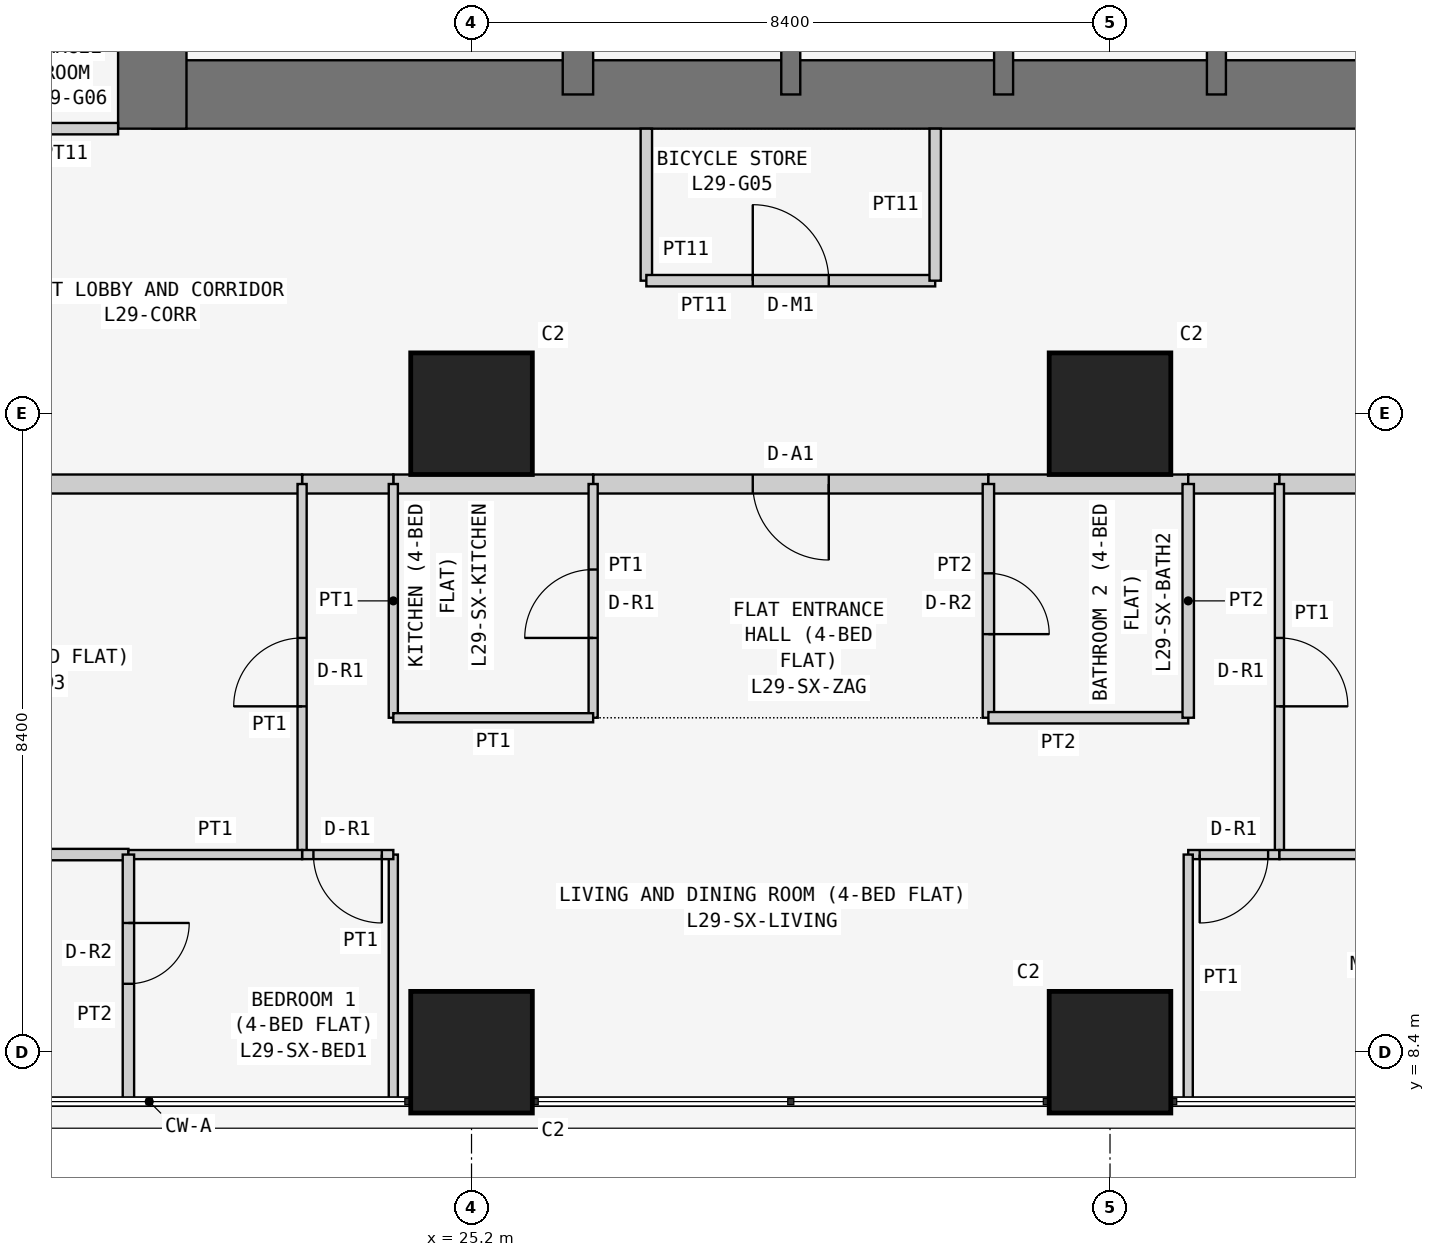
"""IFC4 building model, lengths in metres.
Left out: names, types, materials, properties, quantities, classifications, styles, units other than length and angle.
Written with IfcOpenShell. Run it as: python <this file> out.ifc"""

import sys

from ifc_helpers import new_model, si_unit, direction, frame, frame_2d, origin, origin_2d, place, context, subcontext, project, spatial, rectangle, extrude, element, fill, save


model = new_model("IFC4")
c1 = context("Model", 3, precision=1e-05, world=origin(), true_north=direction((0.0, 1.0)))
c2 = subcontext(c1, "Body", "Model", "MODEL_VIEW")
j1 = project(units=[si_unit("LENGTHUNIT", "METRE"), si_unit("PLANEANGLEUNIT", "RADIAN")], contexts=[c1])
p1 = place(None, origin())
s1 = spatial("IfcSite", under=j1, at=p1, CompositionType="ELEMENT")
p2 = place(p1, origin())
s2 = spatial("IfcBuilding", under=s1, at=p2, CompositionType="ELEMENT")
p3 = place(p2, frame((0.0, 0.0, 116.1)))
s3 = spatial("IfcBuildingStorey", under=s2, at=p3, CompositionType="ELEMENT", Elevation=116.1)
for number, where, z_axis, x_axis in (
    (1, (25.2, 8.4, 0.0), (0.0, 0.0, 1.0), (1.0, 0.0, 0.0)),
    (2, (25.2, 16.8, 0.0), (0.0, 0.0, 1.0), (1.0, 0.0, 0.0)),
    (3, (33.6, 8.4, 0.0), (0.0, 0.0, 1.0), (1.0, 0.0, 0.0)),
    (4, (33.6, 16.8, 0.0), (0.0, 0.0, 1.0), (1.0, 0.0, 0.0)),
):
    element("IfcColumn", number, at=place(p3, frame(where, z_axis=z_axis, x_axis=x_axis)), inside=s3, PredefinedType="COLUMN", context=c2, shape_type="SweptSolid", body=[
        extrude(rectangle(XDim=1.6, YDim=1.6, at=origin_2d()), origin(), (0.0, 0.0, 1.0), 3.6),
    ])
p4 = place(p3, frame((21.0, 21.0, 0.0), z_axis=(0.0, 0.0, 1.0), x_axis=(1.0, 0.0, 0.0)))
e5 = element("IfcWall", 5, at=p4, inside=s3, PredefinedType="SHEAR", context=c2, shape_type="SweptSolid", body=[
    extrude(rectangle(XDim=17.25, YDim=0.9, at=frame_2d((8.625, 0.0))), origin(), (0.0, 0.0, 1.0), 3.6),
])
p5 = place(p3, frame((21.0, 37.8, 0.0), z_axis=(0.0, 0.0, 1.0), x_axis=(0.0, -1.0, 0.0)))
e6 = element("IfcWall", 6, at=p5, inside=s3, PredefinedType="SHEAR", context=c2, shape_type="SweptSolid", body=[
    extrude(rectangle(XDim=17.25, YDim=0.9, at=frame_2d((8.625, 0.0))), origin(), (0.0, 0.0, 1.0), 3.6),
])
p6 = place(p5, frame((5.4, 0.0, 0.0)))
e7 = element("IfcOpeningElement", 7, at=p6, cuts=e6, PredefinedType="OPENING", context=c2, shape_type="SweptSolid", body=[
    extrude(rectangle(XDim=1.2, YDim=2.1, at=frame_2d((0.6, 1.05))), frame((0.0, 0.46, 0.0), z_axis=(0.0, -1.0, 0.0), x_axis=(1.0, 0.0, 0.0)), (0.0, 0.0, 1.0), 0.92),
])
p7 = place(p3, frame((26.6, 21.0, 0.0), z_axis=(0.0, 0.0, 1.0), x_axis=(0.0, 1.0, 0.0)))
e8 = element("IfcWall", 8, at=p7, inside=s3, PredefinedType="SHEAR", context=c2, shape_type="SweptSolid", body=[
    extrude(rectangle(XDim=16.8, YDim=0.4, at=frame_2d((8.4, 0.0))), origin(), (0.0, 0.0, 1.0), 3.6),
])
p8 = place(p7, frame((10.4, 0.0, 0.0)))
e9 = element("IfcOpeningElement", 9, at=p8, cuts=e8, PredefinedType="OPENING", context=c2, shape_type="SweptSolid", body=[
    extrude(rectangle(XDim=1.2, YDim=2.1, at=frame_2d((0.6, 1.05))), frame((0.0, 0.21, 0.0), z_axis=(0.0, -1.0, 0.0), x_axis=(1.0, 0.0, 0.0)), (0.0, 0.0, 1.0), 0.42),
])
for number, where, z_axis, x_axis in (
    (10, (29.4, 21.0, 0.0), (0.0, 0.0, 1.0), (0.0, 1.0, 0.0)),
    (11, (32.2, 21.0, 0.0), (0.0, 0.0, 1.0), (0.0, 1.0, 0.0)),
    (12, (35.0, 21.0, 0.0), (0.0, 0.0, 1.0), (0.0, 1.0, 0.0)),
):
    element("IfcWall", number, at=place(p3, frame(where, z_axis=z_axis, x_axis=x_axis)), inside=s3, PredefinedType="SHEAR", context=c2, shape_type="SweptSolid", body=[
        extrude(rectangle(XDim=3.2, YDim=0.25, at=frame_2d((1.6, 0.0))), origin(), (0.0, 0.0, 1.0), 3.6),
    ])
p9 = place(p3, frame((27.5, 20.55, 0.0), z_axis=(0.0, 0.0, 1.0), x_axis=(0.0, -1.0, 0.0)))
e13 = element("IfcWall", 13, at=p9, inside=s3, PredefinedType="PARTITIONING", context=c2, shape_type="SweptSolid", body=[
    extrude(rectangle(XDim=2.0, YDim=0.15, at=frame_2d((1.0, 0.0))), origin(), (0.0, 0.0, 1.0), 3.45),
])
p10 = place(p3, frame((27.5, 18.55, 0.0), z_axis=(0.0, 0.0, 1.0), x_axis=(1.0, 0.0, 0.0)))
e14 = element("IfcWall", 14, at=p10, inside=s3, PredefinedType="PARTITIONING", context=c2, shape_type="SweptSolid", body=[
    extrude(rectangle(XDim=3.8, YDim=0.15, at=frame_2d((1.9, 0.0))), origin(), (0.0, 0.0, 1.0), 3.45),
])
p11 = place(p10, frame((1.4, 0.0, 0.0)))
e15 = element("IfcOpeningElement", 15, at=p11, cuts=e14, PredefinedType="OPENING", context=c2, shape_type="SweptSolid", body=[
    extrude(rectangle(XDim=1.0, YDim=2.1, at=frame_2d((0.5, 1.05))), frame((0.0, 0.085, 0.0), z_axis=(0.0, -1.0, 0.0), x_axis=(1.0, 0.0, 0.0)), (0.0, 0.0, 1.0), 0.17),
])
p12 = place(p3, frame((31.3, 18.55, 0.0), z_axis=(0.0, 0.0, 1.0), x_axis=(0.0, 1.0, 0.0)))
e16 = element("IfcWall", 16, at=p12, inside=s3, PredefinedType="PARTITIONING", context=c2, shape_type="SweptSolid", body=[
    extrude(rectangle(XDim=2.0, YDim=0.15, at=frame_2d((1.0, 0.0))), origin(), (0.0, 0.0, 1.0), 3.45),
])
p13 = place(p3, frame((19.15, 20.55, 0.0), z_axis=(0.0, 0.0, 1.0), x_axis=(1.0, 0.0, 0.0)))
e17 = element("IfcWall", 17, at=p13, inside=s3, PredefinedType="PARTITIONING", context=c2, shape_type="SweptSolid", body=[
    extrude(rectangle(XDim=1.4, YDim=0.15, at=frame_2d((0.7, 0.0))), origin(), (0.0, 0.0, 1.0), 3.45),
])
p14 = place(p3, frame((32.0, 15.875, 0.0), z_axis=(0.0, 0.0, 1.0), x_axis=(-1.0, 0.0, 0.0)))
e18 = element("IfcWall", 18, at=p14, inside=s3, PredefinedType="PARTITIONING", context=c2, shape_type="SweptSolid", body=[
    extrude(rectangle(XDim=5.2, YDim=0.25, at=frame_2d((2.6, 0.0))), origin(), (0.0, 0.0, 1.0), 3.45),
])
p15 = place(p14, frame((2.1, 0.0, 0.0)))
e19 = element("IfcOpeningElement", 19, at=p15, cuts=e18, PredefinedType="OPENING", context=c2, shape_type="SweptSolid", body=[
    extrude(rectangle(XDim=1.0, YDim=2.1, at=frame_2d((0.5, 1.05))), frame((0.0, 0.135, 0.0), z_axis=(0.0, -1.0, 0.0), x_axis=(1.0, 0.0, 0.0)), (0.0, 0.0, 1.0), 0.27),
])
p16 = place(p3, frame((34.629, 15.875, 0.0), z_axis=(0.0, 0.0, 1.0), x_axis=(-1.0, 0.0, 0.0)))
e20 = element("IfcWall", 20, at=p16, inside=s3, PredefinedType="PARTITIONING", context=c2, shape_type="SweptSolid", body=[
    extrude(rectangle(XDim=2.629, YDim=0.25, at=frame_2d((1.314, 0.0))), origin(), (0.0, 0.0, 1.0), 3.45),
])
p17 = place(p3, frame((26.8, 15.875, 0.0), z_axis=(0.0, 0.0, 1.0), x_axis=(-1.0, 0.0, 0.0)))
e21 = element("IfcWall", 21, at=p17, inside=s3, PredefinedType="PARTITIONING", context=c2, shape_type="SweptSolid", body=[
    extrude(rectangle(XDim=2.629, YDim=0.25, at=frame_2d((1.314, 0.0))), origin(), (0.0, 0.0, 1.0), 3.45),
])
p18 = place(p3, frame((24.171, 15.875, 0.0), z_axis=(0.0, 0.0, 1.0), x_axis=(-1.0, 0.0, 0.0)))
e22 = element("IfcWall", 22, at=p18, inside=s3, PredefinedType="PARTITIONING", context=c2, shape_type="SweptSolid", body=[
    extrude(rectangle(XDim=1.2, YDim=0.25, at=frame_2d((0.6, 0.0))), origin(), (0.0, 0.0, 1.0), 3.45),
])
p19 = place(p3, frame((35.829, 15.875, 0.0), z_axis=(0.0, 0.0, 1.0), x_axis=(-1.0, 0.0, 0.0)))
e23 = element("IfcWall", 23, at=p19, inside=s3, PredefinedType="PARTITIONING", context=c2, shape_type="SweptSolid", body=[
    extrude(rectangle(XDim=1.2, YDim=0.25, at=frame_2d((0.6, 0.0))), origin(), (0.0, 0.0, 1.0), 3.45),
])
for number, where, z_axis, x_axis in (
    (24, (42.7, 15.875, 0.0), (0.0, 0.0, 1.0), (-1.0, 0.0, 0.0)),
    (25, (22.971, 15.875, 0.0), (0.0, 0.0, 1.0), (-1.0, 0.0, 0.0)),
):
    element("IfcWall", number, at=place(p3, frame(where, z_axis=z_axis, x_axis=x_axis)), inside=s3, PredefinedType="PARTITIONING", context=c2, shape_type="SweptSolid", body=[
        extrude(rectangle(XDim=6.871, YDim=0.25, at=frame_2d((3.436, 0.0))), origin(), (0.0, 0.0, 1.0), 3.45),
    ])
p20 = place(p3, frame((32.0, 12.8, 0.0), z_axis=(0.0, 0.0, 1.0), x_axis=(0.0, 1.0, 0.0)))
e26 = element("IfcWall", 26, at=p20, inside=s3, PredefinedType="PARTITIONING", context=c2, shape_type="SweptSolid", body=[
    extrude(rectangle(XDim=3.075, YDim=0.15, at=frame_2d((1.538, 0.0))), origin(), (0.0, 0.0, 1.0), 3.45),
])
p21 = place(p20, frame((1.1, 0.0, 0.0)))
e27 = element("IfcOpeningElement", 27, at=p21, cuts=e26, PredefinedType="OPENING", context=c2, shape_type="SweptSolid", body=[
    extrude(rectangle(XDim=0.8, YDim=2.1, at=frame_2d((0.4, 1.05))), frame((0.0, 0.085, 0.0), z_axis=(0.0, -1.0, 0.0), x_axis=(1.0, 0.0, 0.0)), (0.0, 0.0, 1.0), 0.17),
])
p22 = place(p3, frame((26.8, 15.875, 0.0), z_axis=(0.0, 0.0, 1.0), x_axis=(0.0, -1.0, 0.0)))
e28 = element("IfcWall", 28, at=p22, inside=s3, PredefinedType="PARTITIONING", context=c2, shape_type="SweptSolid", body=[
    extrude(rectangle(XDim=3.075, YDim=0.12, at=frame_2d((1.538, 0.0))), origin(), (0.0, 0.0, 1.0), 3.45),
])
p23 = place(p22, frame((1.125, 0.0, 0.0)))
e29 = element("IfcOpeningElement", 29, at=p23, cuts=e28, PredefinedType="OPENING", context=c2, shape_type="SweptSolid", body=[
    extrude(rectangle(XDim=0.9, YDim=2.1, at=frame_2d((0.45, 1.05))), frame((0.0, 0.07, 0.0), z_axis=(0.0, -1.0, 0.0), x_axis=(1.0, 0.0, 0.0)), (0.0, 0.0, 1.0), 0.14),
])
p24 = place(p3, frame((32.0, 12.8, 0.0), z_axis=(0.0, 0.0, 1.0), x_axis=(1.0, 0.0, 0.0)))
e30 = element("IfcWall", 30, at=p24, inside=s3, PredefinedType="PARTITIONING", context=c2, shape_type="SweptSolid", body=[
    extrude(rectangle(XDim=2.629, YDim=0.15, at=frame_2d((1.314, 0.0))), origin(), (0.0, 0.0, 1.0), 3.45),
])
p25 = place(p3, frame((34.629, 12.8, 0.0), z_axis=(0.0, 0.0, 1.0), x_axis=(0.0, 1.0, 0.0)))
e31 = element("IfcWall", 31, at=p25, inside=s3, PredefinedType="PARTITIONING", context=c2, shape_type="SweptSolid", body=[
    extrude(rectangle(XDim=3.075, YDim=0.15, at=frame_2d((1.538, 0.0))), origin(), (0.0, 0.0, 1.0), 3.45),
])
p26 = place(p3, frame((24.171, 15.875, 0.0), z_axis=(0.0, 0.0, 1.0), x_axis=(0.0, -1.0, 0.0)))
e32 = element("IfcWall", 32, at=p26, inside=s3, PredefinedType="PARTITIONING", context=c2, shape_type="SweptSolid", body=[
    extrude(rectangle(XDim=3.075, YDim=0.12, at=frame_2d((1.538, 0.0))), origin(), (0.0, 0.0, 1.0), 3.45),
])
p27 = place(p3, frame((24.171, 12.8, 0.0), z_axis=(0.0, 0.0, 1.0), x_axis=(1.0, 0.0, 0.0)))
e33 = element("IfcWall", 33, at=p27, inside=s3, PredefinedType="PARTITIONING", context=c2, shape_type="SweptSolid", body=[
    extrude(rectangle(XDim=2.629, YDim=0.12, at=frame_2d((1.314, 0.0))), origin(), (0.0, 0.0, 1.0), 3.45),
])
p28 = place(p3, frame((35.829, 15.875, 0.0), z_axis=(0.0, 0.0, 1.0), x_axis=(0.0, -1.0, 0.0)))
e34 = element("IfcWall", 34, at=p28, inside=s3, PredefinedType="PARTITIONING", context=c2, shape_type="SweptSolid", body=[
    extrude(rectangle(XDim=4.875, YDim=0.12, at=frame_2d((2.438, 0.0))), origin(), (0.0, 0.0, 1.0), 3.45),
])
p29 = place(p28, frame((2.025, 0.0, 0.0)))
e35 = element("IfcOpeningElement", 35, at=p29, cuts=e34, PredefinedType="OPENING", context=c2, shape_type="SweptSolid", body=[
    extrude(rectangle(XDim=0.9, YDim=2.1, at=frame_2d((0.45, 1.05))), frame((0.0, 0.07, 0.0), z_axis=(0.0, -1.0, 0.0), x_axis=(1.0, 0.0, 0.0)), (0.0, 0.0, 1.0), 0.14),
])
p30 = place(p3, frame((35.829, 11.0, 0.0), z_axis=(0.0, 0.0, 1.0), x_axis=(-1.0, 0.0, 0.0)))
e36 = element("IfcWall", 36, at=p30, inside=s3, PredefinedType="PARTITIONING", context=c2, shape_type="SweptSolid", body=[
    extrude(rectangle(XDim=1.2, YDim=0.12, at=frame_2d((0.6, 0.0))), origin(), (0.0, 0.0, 1.0), 3.45),
])
p31 = place(p30, frame((0.149, 0.0, 0.0)))
e37 = element("IfcOpeningElement", 37, at=p31, cuts=e36, PredefinedType="OPENING", context=c2, shape_type="SweptSolid", body=[
    extrude(rectangle(XDim=0.9, YDim=2.1, at=frame_2d((0.45, 1.05))), frame((0.0, 0.07, 0.0), z_axis=(0.0, -1.0, 0.0), x_axis=(1.0, 0.0, 0.0)), (0.0, 0.0, 1.0), 0.14),
])
p32 = place(p3, frame((34.629, 11.0, 0.0), z_axis=(0.0, 0.0, 1.0), x_axis=(0.0, -1.0, 0.0)))
e38 = element("IfcWall", 38, at=p32, inside=s3, PredefinedType="PARTITIONING", context=c2, shape_type="SweptSolid", body=[
    extrude(rectangle(XDim=3.25, YDim=0.12, at=frame_2d((1.625, 0.0))), origin(), (0.0, 0.0, 1.0), 3.45),
])
p33 = place(p3, frame((22.971, 11.0, 0.0), z_axis=(0.0, 0.0, 1.0), x_axis=(0.0, 1.0, 0.0)))
e39 = element("IfcWall", 39, at=p33, inside=s3, PredefinedType="PARTITIONING", context=c2, shape_type="SweptSolid", body=[
    extrude(rectangle(XDim=4.875, YDim=0.12, at=frame_2d((2.438, 0.0))), origin(), (0.0, 0.0, 1.0), 3.45),
])
p34 = place(p33, frame((1.95, 0.0, 0.0)))
e40 = element("IfcOpeningElement", 40, at=p34, cuts=e39, PredefinedType="OPENING", context=c2, shape_type="SweptSolid", body=[
    extrude(rectangle(XDim=0.9, YDim=2.1, at=frame_2d((0.45, 1.05))), frame((0.0, 0.07, 0.0), z_axis=(0.0, -1.0, 0.0), x_axis=(1.0, 0.0, 0.0)), (0.0, 0.0, 1.0), 0.14),
])
p35 = place(p3, frame((24.171, 7.75, 0.0), z_axis=(0.0, 0.0, 1.0), x_axis=(0.0, 1.0, 0.0)))
e41 = element("IfcWall", 41, at=p35, inside=s3, PredefinedType="PARTITIONING", context=c2, shape_type="SweptSolid", body=[
    extrude(rectangle(XDim=3.25, YDim=0.12, at=frame_2d((1.625, 0.0))), origin(), (0.0, 0.0, 1.0), 3.45),
])
p36 = place(p3, frame((24.171, 11.0, 0.0), z_axis=(0.0, 0.0, 1.0), x_axis=(-1.0, 0.0, 0.0)))
e42 = element("IfcWall", 42, at=p36, inside=s3, PredefinedType="PARTITIONING", context=c2, shape_type="SweptSolid", body=[
    extrude(rectangle(XDim=1.2, YDim=0.12, at=frame_2d((0.6, 0.0))), origin(), (0.0, 0.0, 1.0), 3.45),
])
p37 = place(p36, frame((0.151, 0.0, 0.0)))
e43 = element("IfcOpeningElement", 43, at=p37, cuts=e42, PredefinedType="OPENING", context=c2, shape_type="SweptSolid", body=[
    extrude(rectangle(XDim=0.9, YDim=2.1, at=frame_2d((0.45, 1.05))), frame((0.0, 0.07, 0.0), z_axis=(0.0, -1.0, 0.0), x_axis=(1.0, 0.0, 0.0)), (0.0, 0.0, 1.0), 0.14),
])
p38 = place(p3, frame((35.829, 11.0, 0.0), z_axis=(0.0, 0.0, 1.0), x_axis=(1.0, 0.0, 0.0)))
e44 = element("IfcWall", 44, at=p38, inside=s3, PredefinedType="PARTITIONING", context=c2, shape_type="SweptSolid", body=[
    extrude(rectangle(XDim=6.871, YDim=0.12, at=frame_2d((3.436, 0.0))), origin(), (0.0, 0.0, 1.0), 3.45),
])
p39 = place(p3, frame((16.1, 11.0, 0.0), z_axis=(0.0, 0.0, 1.0), x_axis=(1.0, 0.0, 0.0)))
e45 = element("IfcWall", 45, at=p39, inside=s3, PredefinedType="PARTITIONING", context=c2, shape_type="SweptSolid", body=[
    extrude(rectangle(XDim=4.586, YDim=0.15, at=frame_2d((2.293, 0.0))), origin(), (0.0, 0.0, 1.0), 3.45),
])
p40 = place(p3, frame((20.686, 11.0, 0.0), z_axis=(0.0, 0.0, 1.0), x_axis=(1.0, 0.0, 0.0)))
e46 = element("IfcWall", 46, at=p40, inside=s3, PredefinedType="PARTITIONING", context=c2, shape_type="SweptSolid", body=[
    extrude(rectangle(XDim=2.285, YDim=0.12, at=frame_2d((1.143, 0.0))), origin(), (0.0, 0.0, 1.0), 3.45),
])
p41 = place(p3, frame((20.686, 7.75, 0.0), z_axis=(0.0, 0.0, 1.0), x_axis=(0.0, 1.0, 0.0)))
e47 = element("IfcWall", 47, at=p41, inside=s3, PredefinedType="PARTITIONING", context=c2, shape_type="SweptSolid", body=[
    extrude(rectangle(XDim=3.25, YDim=0.15, at=frame_2d((1.625, 0.0))), origin(), (0.0, 0.0, 1.0), 3.45),
])
p42 = place(p41, frame((1.55, 0.0, 0.0)))
e48 = element("IfcOpeningElement", 48, at=p42, cuts=e47, PredefinedType="OPENING", context=c2, shape_type="SweptSolid", body=[
    extrude(rectangle(XDim=0.8, YDim=2.1, at=frame_2d((0.4, 1.05))), frame((0.0, 0.085, 0.0), z_axis=(0.0, -1.0, 0.0), x_axis=(1.0, 0.0, 0.0)), (0.0, 0.0, 1.0), 0.17),
])
p43 = place(p11, origin())
e49 = element("IfcDoor", 49, at=p43, inside=s3, OperationType="SINGLE_SWING_LEFT", PredefinedType="DOOR", context=c2, shape_type="SweptSolid", body=[
    extrude(rectangle(XDim=1.0, YDim=2.1, at=frame_2d((0.5, 1.05))), frame((0.0, 0.025, 0.0), z_axis=(0.0, -1.0, 0.0), x_axis=(1.0, 0.0, 0.0)), (0.0, 0.0, 1.0), 0.05),
])
fill(e15, e49)
p44 = place(p15, origin())
e50 = element("IfcDoor", 50, at=p44, inside=s3, OperationType="SINGLE_SWING_LEFT", PredefinedType="DOOR", context=c2, shape_type="SweptSolid", body=[
    extrude(rectangle(XDim=1.0, YDim=2.1, at=frame_2d((0.5, 1.05))), frame((0.0, 0.025, 0.0), z_axis=(0.0, -1.0, 0.0), x_axis=(1.0, 0.0, 0.0)), (0.0, 0.0, 1.0), 0.05),
])
fill(e19, e50)
p45 = place(p21, frame((0.8, 0.0, 0.0), z_axis=(0.0, 0.0, 1.0), x_axis=(-1.0, 0.0, 0.0)))
e51 = element("IfcDoor", 51, at=p45, inside=s3, OperationType="SINGLE_SWING_RIGHT", PredefinedType="DOOR", context=c2, shape_type="SweptSolid", body=[
    extrude(rectangle(XDim=0.8, YDim=2.1, at=frame_2d((0.4, 1.05))), frame((0.0, 0.025, 0.0), z_axis=(0.0, -1.0, 0.0), x_axis=(1.0, 0.0, 0.0)), (0.0, 0.0, 1.0), 0.05),
])
fill(e27, e51)
p46 = place(p23, frame((0.9, 0.0, 0.0), z_axis=(0.0, 0.0, 1.0), x_axis=(-1.0, 0.0, 0.0)))
e52 = element("IfcDoor", 52, at=p46, inside=s3, OperationType="SINGLE_SWING_LEFT", PredefinedType="DOOR", context=c2, shape_type="SweptSolid", body=[
    extrude(rectangle(XDim=0.9, YDim=2.1, at=frame_2d((0.45, 1.05))), frame((0.0, 0.025, 0.0), z_axis=(0.0, -1.0, 0.0), x_axis=(1.0, 0.0, 0.0)), (0.0, 0.0, 1.0), 0.05),
])
fill(e29, e52)
p47 = place(p29, origin())
e53 = element("IfcDoor", 53, at=p47, inside=s3, OperationType="SINGLE_SWING_RIGHT", PredefinedType="DOOR", context=c2, shape_type="SweptSolid", body=[
    extrude(rectangle(XDim=0.9, YDim=2.1, at=frame_2d((0.45, 1.05))), frame((0.0, 0.025, 0.0), z_axis=(0.0, -1.0, 0.0), x_axis=(1.0, 0.0, 0.0)), (0.0, 0.0, 1.0), 0.05),
])
fill(e35, e53)
p48 = place(p31, origin())
e54 = element("IfcDoor", 54, at=p48, inside=s3, OperationType="SINGLE_SWING_RIGHT", PredefinedType="DOOR", context=c2, shape_type="SweptSolid", body=[
    extrude(rectangle(XDim=0.9, YDim=2.1, at=frame_2d((0.45, 1.05))), frame((0.0, 0.025, 0.0), z_axis=(0.0, -1.0, 0.0), x_axis=(1.0, 0.0, 0.0)), (0.0, 0.0, 1.0), 0.05),
])
fill(e37, e54)
p49 = place(p34, origin())
e55 = element("IfcDoor", 55, at=p49, inside=s3, OperationType="SINGLE_SWING_LEFT", PredefinedType="DOOR", context=c2, shape_type="SweptSolid", body=[
    extrude(rectangle(XDim=0.9, YDim=2.1, at=frame_2d((0.45, 1.05))), frame((0.0, 0.025, 0.0), z_axis=(0.0, -1.0, 0.0), x_axis=(1.0, 0.0, 0.0)), (0.0, 0.0, 1.0), 0.05),
])
fill(e40, e55)
p50 = place(p37, origin())
e56 = element("IfcDoor", 56, at=p50, inside=s3, OperationType="SINGLE_SWING_LEFT", PredefinedType="DOOR", context=c2, shape_type="SweptSolid", body=[
    extrude(rectangle(XDim=0.9, YDim=2.1, at=frame_2d((0.45, 1.05))), frame((0.0, 0.025, 0.0), z_axis=(0.0, -1.0, 0.0), x_axis=(1.0, 0.0, 0.0)), (0.0, 0.0, 1.0), 0.05),
])
fill(e43, e56)
p51 = place(p42, frame((0.8, 0.0, 0.0), z_axis=(0.0, 0.0, 1.0), x_axis=(-1.0, 0.0, 0.0)))
e57 = element("IfcDoor", 57, at=p51, inside=s3, OperationType="SINGLE_SWING_LEFT", PredefinedType="DOOR", context=c2, shape_type="SweptSolid", body=[
    extrude(rectangle(XDim=0.8, YDim=2.1, at=frame_2d((0.4, 1.05))), frame((0.0, 0.025, 0.0), z_axis=(0.0, -1.0, 0.0), x_axis=(1.0, 0.0, 0.0)), (0.0, 0.0, 1.0), 0.05),
])
fill(e48, e57)
save(model, sys.argv[1])
